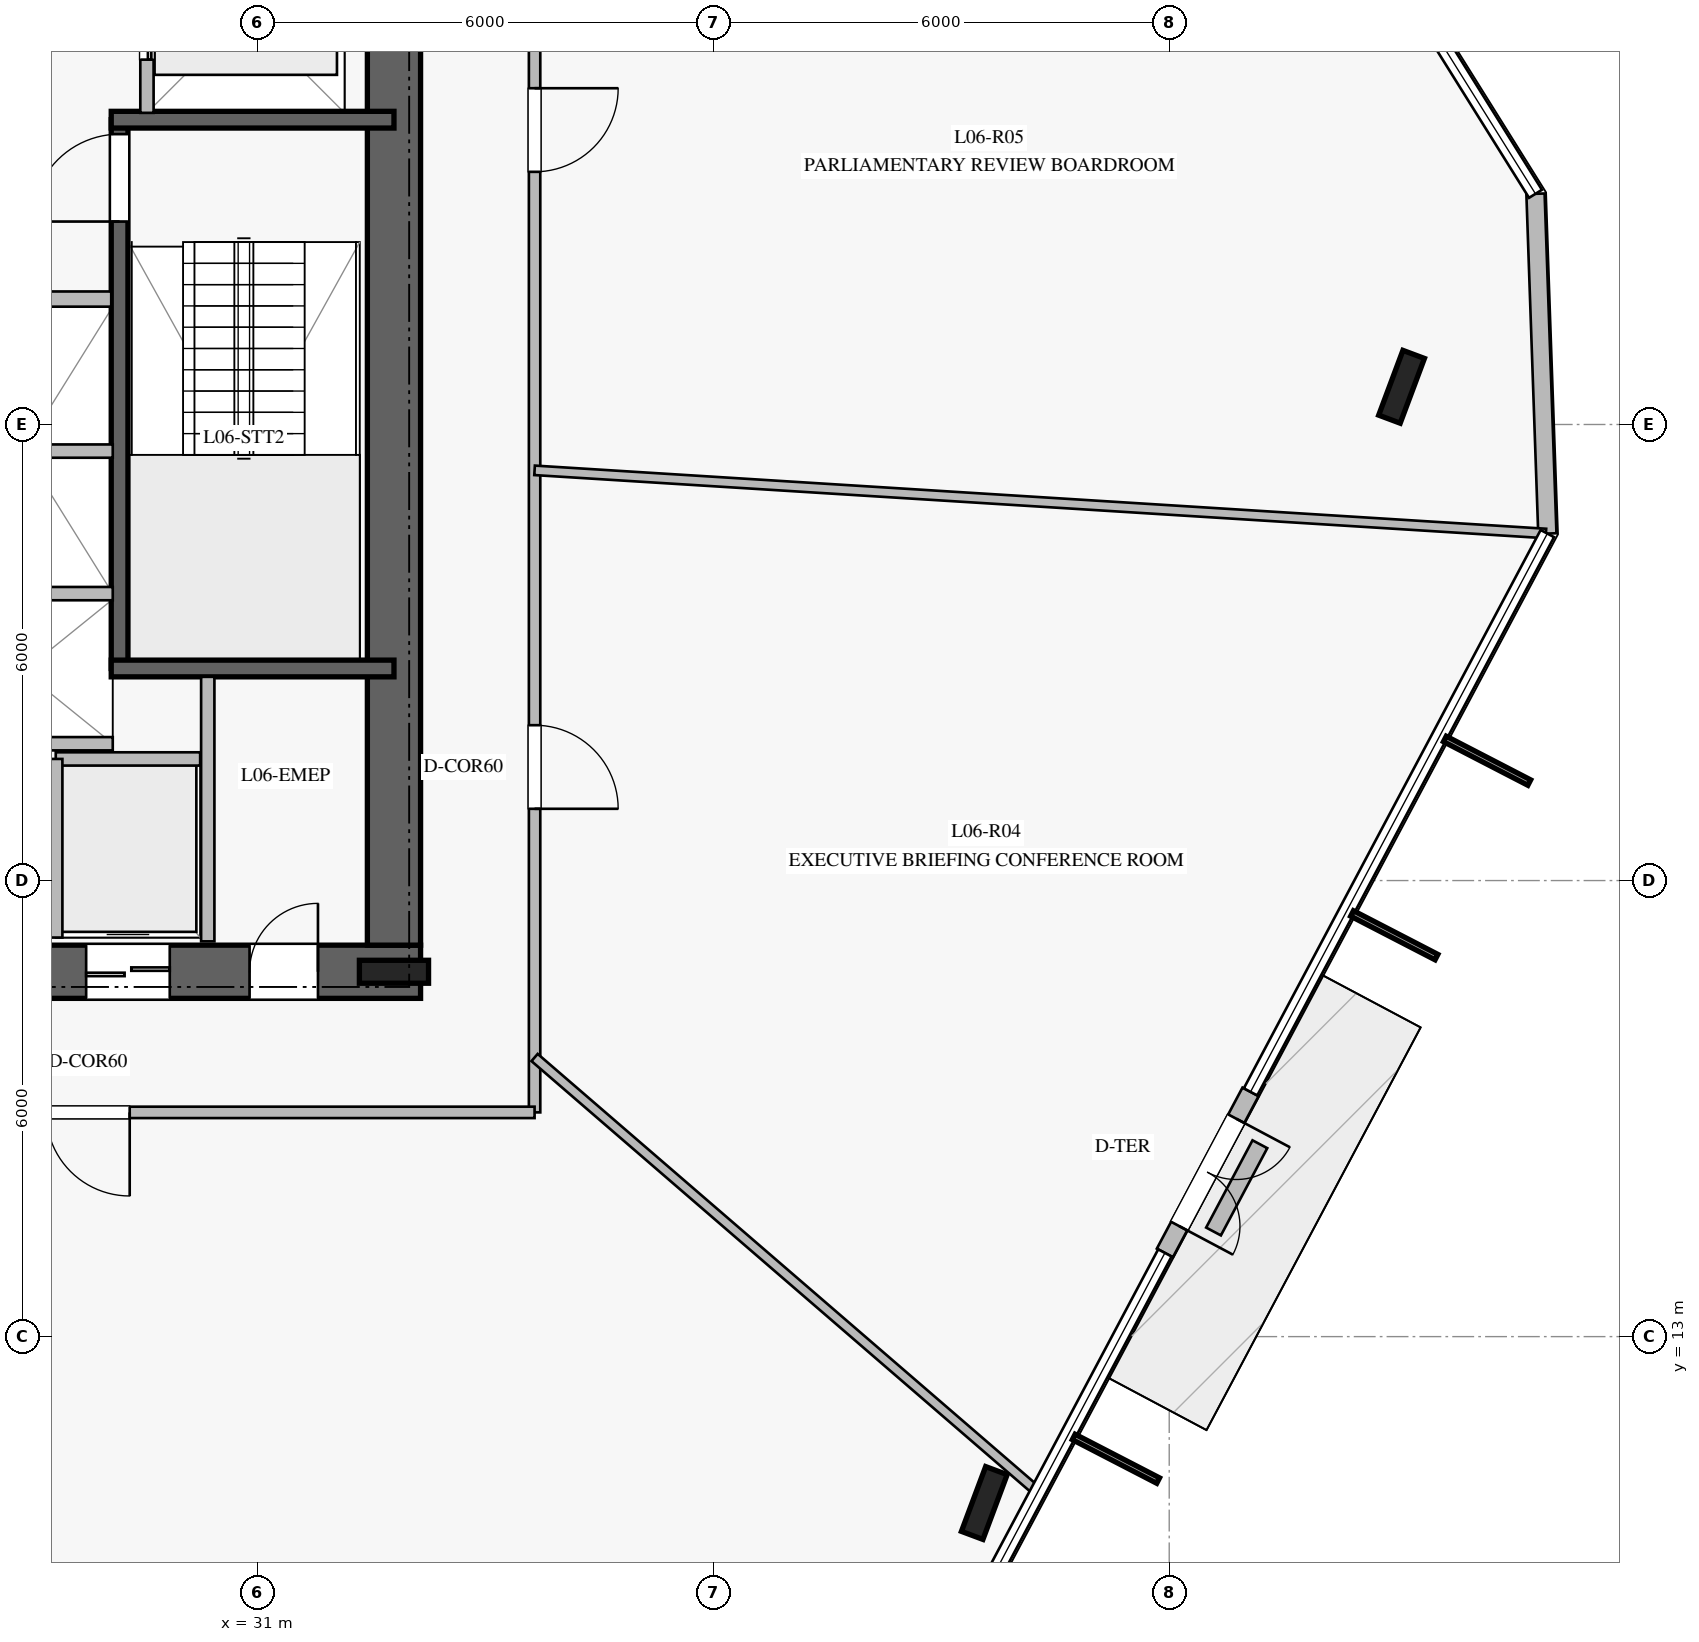
"""IFC4 building model, lengths in metres.
Left out: names, types, materials, properties, quantities, classifications, styles, units other than length and angle.
Written with IfcOpenShell. Run it as: python <this file> out.ifc"""

import sys

from ifc_helpers import new_model, si_unit, direction, frame, frame_2d, origin, origin_2d, place, context, subcontext, project, spatial, rectangle, i_section, extrude, element, fill, save


model = new_model("IFC4")
c1 = context("Model", 3, precision=1e-05, world=origin(), true_north=direction((0.0, 1.0)))
c2 = subcontext(c1, "Body", "Model", "MODEL_VIEW")
j1 = project(units=[si_unit("LENGTHUNIT", "METRE"), si_unit("PLANEANGLEUNIT", "RADIAN")], contexts=[c1])
p1 = place(None, origin())
s1 = spatial("IfcSite", under=j1, at=p1, CompositionType="ELEMENT")
p2 = place(p1, origin())
s2 = spatial("IfcBuilding", under=s1, at=p2, CompositionType="ELEMENT")
p3 = place(p2, frame((0.0, 0.0, 28.0)))
s3 = spatial("IfcBuildingStorey", under=s2, at=p3, CompositionType="ELEMENT", Elevation=28.0)
p4 = place(p3, frame((16.85, 17.8, 0.0), z_axis=(0.0, 0.0, 1.0), x_axis=(1.0, 0.0, 0.0)))
e1 = element("IfcWall", 1, at=p4, inside=s3, PredefinedType="SHEAR", context=c2, shape_type="SweptSolid", body=[
    extrude(rectangle(XDim=16.3, YDim=0.7, at=frame_2d((8.15, 0.0))), origin(), (0.0, 0.0, 1.0), 3.76),
])
p5 = place(p4, frame((5.1, 0.0, 0.0)))
e2 = element("IfcOpeningElement", 2, at=p5, cuts=e1, PredefinedType="OPENING", context=c2, shape_type="SweptSolid", body=[
    extrude(rectangle(XDim=1.2, YDim=2.25, at=frame_2d((0.6, 1.125))), frame((0.0, 0.36, 0.0), z_axis=(0.0, -1.0, 0.0), x_axis=(1.0, 0.0, 0.0)), (0.0, 0.0, 1.0), 0.72),
])
p6 = place(p4, frame((14.05, 0.0, 0.0)))
e3 = element("IfcOpeningElement", 3, at=p6, cuts=e1, PredefinedType="OPENING", context=c2, shape_type="SweptSolid", body=[
    extrude(rectangle(XDim=0.9, YDim=2.1, at=frame_2d((0.45, 1.05))), frame((0.0, 0.36, 0.0), z_axis=(0.0, -1.0, 0.0), x_axis=(1.0, 0.0, 0.0)), (0.0, 0.0, 1.0), 0.72),
])
p7 = place(p4, frame((7.95, 0.0, 0.0)))
e4 = element("IfcOpeningElement", 4, at=p7, cuts=e1, PredefinedType="OPENING", context=c2, shape_type="SweptSolid", body=[
    extrude(rectangle(XDim=1.1, YDim=2.2, at=frame_2d((0.55, 1.1))), frame((0.0, 0.36, 0.0), z_axis=(0.0, -1.0, 0.0), x_axis=(1.0, 0.0, 0.0)), (0.0, 0.0, 1.0), 0.72),
])
p8 = place(p4, frame((9.925, 0.0, 0.0)))
e5 = element("IfcOpeningElement", 5, at=p8, cuts=e1, PredefinedType="OPENING", context=c2, shape_type="SweptSolid", body=[
    extrude(rectangle(XDim=1.1, YDim=2.2, at=frame_2d((0.55, 1.1))), frame((0.0, 0.36, 0.0), z_axis=(0.0, -1.0, 0.0), x_axis=(1.0, 0.0, 0.0)), (0.0, 0.0, 1.0), 0.72),
])
p9 = place(p4, frame((11.9, 0.0, 0.0)))
e6 = element("IfcOpeningElement", 6, at=p9, cuts=e1, PredefinedType="OPENING", context=c2, shape_type="SweptSolid", body=[
    extrude(rectangle(XDim=1.1, YDim=2.2, at=frame_2d((0.55, 1.1))), frame((0.0, 0.36, 0.0), z_axis=(0.0, -1.0, 0.0), x_axis=(1.0, 0.0, 0.0)), (0.0, 0.0, 1.0), 0.72),
])
p10 = place(p3, frame((32.8, 18.15, 0.0), z_axis=(0.0, 0.0, 1.0), x_axis=(0.0, 1.0, 0.0)))
e7 = element("IfcWall", 7, at=p10, inside=s3, PredefinedType="SHEAR", context=c2, shape_type="SweptSolid", body=[
    extrude(rectangle(XDim=13.7, YDim=0.7, at=frame_2d((6.85, 0.0))), origin(), (0.0, 0.0, 1.0), 3.76),
])
p11 = place(p3, frame((32.8, 17.8, 0.0), z_axis=(0.0, 0.0, 1.0), x_axis=(1.0, 0.0, 0.0)))
e8 = element("IfcColumn", 8, at=p11, inside=s3, PredefinedType="COLUMN", context=c2, shape_type="SweptSolid", body=[
    extrude(i_section(OverallWidth=0.302, OverallDepth=0.91, WebThickness=0.021, FlangeThickness=0.04, at=origin_2d()), origin(), (0.0, 0.0, 1.0), 4.0),
])
p12 = place(p3, frame((29.19, 21.79, 0.0), z_axis=(0.0, 0.0, 1.0), x_axis=(0.0, 1.0, 0.0)))
e9 = element("IfcWall", 9, at=p12, inside=s3, PredefinedType="SOLIDWALL", context=c2, shape_type="SweptSolid", body=[
    extrude(rectangle(XDim=7.22, YDim=0.22, at=frame_2d((3.61, 0.0))), origin(), (0.0, 0.0, 1.0), 3.76),
])
p13 = place(p12, frame((5.88, 0.0, 0.0)))
e10 = element("IfcOpeningElement", 10, at=p13, cuts=e9, PredefinedType="OPENING", context=c2, shape_type="SweptSolid", body=[
    extrude(rectangle(XDim=1.15, YDim=2.2, at=frame_2d((0.575, 1.1))), frame((0.0, 0.12, 0.0), z_axis=(0.0, -1.0, 0.0), x_axis=(1.0, 0.0, 0.0)), (0.0, 0.0, 1.0), 0.24),
])
for number, where, z_axis, x_axis in (
    (11, (29.08, 21.79, 0.0), (0.0, 0.0, 1.0), (1.0, 0.0, 0.0)),
    (12, (29.08, 29.01, 0.0), (0.0, 0.0, 1.0), (1.0, 0.0, 0.0)),
):
    element("IfcWall", number, at=place(p3, frame(where, z_axis=z_axis, x_axis=x_axis)), inside=s3, PredefinedType="SOLIDWALL", context=c2, shape_type="SweptSolid", body=[
        extrude(rectangle(XDim=3.72, YDim=0.22, at=frame_2d((1.86, 0.0))), origin(), (0.0, 0.0, 1.0), 3.76),
    ])
for number, where, z_axis, x_axis in (
    (13, (40.567, 10.811, 0.0), (0.0, 0.0, 1.0), (0.35, 0.937, 0.0)),
    (14, (46.057, 25.496, 0.0), (0.0, 0.0, 1.0), (0.35, 0.937, 0.0)),
):
    element("IfcColumn", number, at=place(p3, frame(where, z_axis=z_axis, x_axis=x_axis)), inside=s3, PredefinedType="COLUMN", context=c2, shape_type="SweptSolid", body=[
        extrude(i_section(OverallWidth=0.302, OverallDepth=0.91, WebThickness=0.021, FlangeThickness=0.04, at=origin_2d()), origin(), (0.0, 0.0, 1.0), 4.0),
    ])
p14 = place(p3, frame((42.943, 14.101, 0.0), z_axis=(0.0, 0.0, 1.0), x_axis=(0.469574169619, 0.88289302819, 0.0)))
e15 = element("IfcWall", 15, at=p14, inside=s3, PredefinedType="STANDARD", context=c2, shape_type="SweptSolid", body=[
    extrude(rectangle(XDim=2.4, YDim=0.24, at=frame_2d((1.2, 0.0))), origin(), (0.0, 0.0, 1.0), 3.76),
])
p15 = place(p14, frame((0.4, 0.0, 0.0)))
e16 = element("IfcOpeningElement", 16, at=p15, cuts=e15, PredefinedType="OPENING", context=c2, shape_type="SweptSolid", body=[
    extrude(rectangle(XDim=1.6, YDim=2.25, at=frame_2d((0.8, 1.125))), frame((0.0, 0.13, 0.0), z_axis=(0.0, -1.0, 0.0), x_axis=(1.0, 0.0, 0.0)), (0.0, 0.0, 1.0), 0.26),
])
p16 = place(p3, frame((47.975, 23.565, 0.0), z_axis=(0.0, 0.0, 1.0), x_axis=(-0.034879631963, 0.999391520513, 0.0)))
e17 = element("IfcWall", 17, at=p16, inside=s3, PredefinedType="STANDARD", context=c2, shape_type="SweptSolid", body=[
    extrude(rectangle(XDim=4.473, YDim=0.24, at=frame_2d((2.236, 0.0))), origin(), (0.0, 0.0, 1.0), 3.76),
])
p17 = place(p3, frame((43.583, 14.383, 0.0), z_axis=(0.0, 0.0, 1.0), x_axis=(0.4693108362, 0.883033033938, 0.0)))
e18 = element("IfcWall", 18, at=p17, inside=s3, PredefinedType="USERDEFINED", context=c2, shape_type="SweptSolid", body=[
    extrude(rectangle(XDim=1.3, YDim=0.22, at=frame_2d((0.65, 0.0))), origin(), (0.0, 0.0, 1.0), 0.4),
])
p18 = place(p3, frame((25.7, 26.65, 0.0), z_axis=(0.0, 0.0, 1.0), x_axis=(1.0, 0.0, 0.0)))
e19 = element("IfcWall", 19, at=p18, inside=s3, PredefinedType="PARTITIONING", context=c2, shape_type="SweptSolid", body=[
    extrude(rectangle(XDim=3.38, YDim=0.2, at=frame_2d((1.69, 0.0))), origin(), (0.0, 0.0, 1.0), 3.76),
])
p19 = place(p3, frame((30.35, 18.2, 0.0), z_axis=(0.0, 0.0, 1.0), x_axis=(0.0, 1.0, 0.0)))
e20 = element("IfcWall", 20, at=p19, inside=s3, PredefinedType="PARTITIONING", context=c2, shape_type="SweptSolid", body=[
    extrude(rectangle(XDim=3.48, YDim=0.175, at=frame_2d((1.74, 0.0))), origin(), (0.0, 0.0, 1.0), 3.76),
])
p20 = place(p3, frame((28.35, 20.6, 0.0), z_axis=(0.0, 0.0, 1.0), x_axis=(1.0, 0.0, 0.0)))
e21 = element("IfcWall", 21, at=p20, inside=s3, PredefinedType="PARTITIONING", context=c2, shape_type="SweptSolid", body=[
    extrude(rectangle(XDim=1.9, YDim=0.175, at=frame_2d((0.95, 0.0))), origin(), (0.0, 0.0, 1.0), 3.76),
])
for number, where, z_axis, x_axis in (
    (22, (28.35, 18.25, 0.0), (0.0, 0.0, 1.0), (0.0, 1.0, 0.0)),
    (23, (26.75, 20.8, 0.0), (0.0, 0.0, 1.0), (1.0, 0.0, 0.0)),
    (24, (26.75, 22.775, 0.0), (0.0, 0.0, 1.0), (1.0, 0.0, 0.0)),
    (25, (26.75, 24.65, 0.0), (0.0, 0.0, 1.0), (1.0, 0.0, 0.0)),
):
    element("IfcWall", number, at=place(p3, frame(where, z_axis=z_axis, x_axis=x_axis)), inside=s3, PredefinedType="PARTITIONING", context=c2, shape_type="SweptSolid", body=[
        extrude(rectangle(XDim=2.35, YDim=0.175, at=frame_2d((1.175, 0.0))), origin(), (0.0, 0.0, 1.0), 3.76),
    ])
p21 = place(p3, frame((29.55, 29.1, 0.0), z_axis=(0.0, 0.0, 1.0), x_axis=(0.0, 1.0, 0.0)))
e26 = element("IfcWall", 26, at=p21, inside=s3, PredefinedType="PARTITIONING", context=c2, shape_type="SweptSolid", body=[
    extrude(rectangle(XDim=2.6, YDim=0.175, at=frame_2d((1.3, 0.0))), origin(), (0.0, 0.0, 1.0), 3.76),
])
p22 = place(p21, frame((0.7, 0.0, 0.0)))
e27 = element("IfcOpeningElement", 27, at=p22, cuts=e26, PredefinedType="OPENING", context=c2, shape_type="SweptSolid", body=[
    extrude(rectangle(XDim=1.2, YDim=2.2, at=frame_2d((0.6, 1.1))), frame((0.0, 0.098, 0.0), z_axis=(0.0, -1.0, 0.0), x_axis=(1.0, 0.0, 0.0)), (0.0, 0.0, 1.0), 0.195),
])
p23 = place(p3, frame((34.65, 34.05, 0.0), z_axis=(0.0, 0.0, 1.0), x_axis=(0.0, -1.0, 0.0)))
e28 = element("IfcWall", 28, at=p23, inside=s3, PredefinedType="PARTITIONING", context=c2, shape_type="SweptSolid", body=[
    extrude(rectangle(XDim=18.1, YDim=0.15, at=frame_2d((9.05, 0.0))), origin(), (0.0, 0.0, 1.0), 3.21),
])
p24 = place(p23, frame((13.006, 0.0, 0.0)))
e29 = element("IfcOpeningElement", 29, at=p24, cuts=e28, PredefinedType="OPENING", context=c2, shape_type="SweptSolid", body=[
    extrude(rectangle(XDim=1.1, YDim=2.2, at=frame_2d((0.55, 1.1))), frame((0.0, 0.085, 0.0), z_axis=(0.0, -1.0, 0.0), x_axis=(1.0, 0.0, 0.0)), (0.0, 0.0, 1.0), 0.17),
])
p25 = place(p23, frame((4.626, 0.0, 0.0)))
e30 = element("IfcOpeningElement", 30, at=p25, cuts=e28, PredefinedType="OPENING", context=c2, shape_type="SweptSolid", body=[
    extrude(rectangle(XDim=1.1, YDim=2.2, at=frame_2d((0.55, 1.1))), frame((0.0, 0.085, 0.0), z_axis=(0.0, -1.0, 0.0), x_axis=(1.0, 0.0, 0.0)), (0.0, 0.0, 1.0), 0.17),
])
p26 = place(p3, frame((34.65, 15.95, 0.0), z_axis=(0.0, 0.0, 1.0), x_axis=(-1.0, 0.0, 0.0)))
e31 = element("IfcWall", 31, at=p26, inside=s3, PredefinedType="PARTITIONING", context=c2, shape_type="SweptSolid", body=[
    extrude(rectangle(XDim=19.3, YDim=0.15, at=frame_2d((9.65, 0.0))), origin(), (0.0, 0.0, 1.0), 3.21),
])
p27 = place(p26, frame((14.523, 0.0, 0.0)))
e32 = element("IfcOpeningElement", 32, at=p27, cuts=e31, PredefinedType="OPENING", context=c2, shape_type="SweptSolid", body=[
    extrude(rectangle(XDim=1.1, YDim=2.2, at=frame_2d((0.55, 1.1))), frame((0.0, 0.085, 0.0), z_axis=(0.0, -1.0, 0.0), x_axis=(1.0, 0.0, 0.0)), (0.0, 0.0, 1.0), 0.17),
])
p28 = place(p26, frame((5.327, 0.0, 0.0)))
e33 = element("IfcOpeningElement", 33, at=p28, cuts=e31, PredefinedType="OPENING", context=c2, shape_type="SweptSolid", body=[
    extrude(rectangle(XDim=1.1, YDim=2.2, at=frame_2d((0.55, 1.1))), frame((0.0, 0.085, 0.0), z_axis=(0.0, -1.0, 0.0), x_axis=(1.0, 0.0, 0.0)), (0.0, 0.0, 1.0), 0.17),
])
p29 = place(p3, frame((34.65, 16.672, 0.0), z_axis=(0.0, 0.0, 1.0), x_axis=(0.757044964205, -0.65336277991, 0.0)))
e34 = element("IfcWall", 34, at=p29, inside=s3, PredefinedType="PARTITIONING", context=c2, shape_type="SweptSolid", body=[
    extrude(rectangle(XDim=8.729, YDim=0.125, at=frame_2d((4.364, 0.0))), origin(), (0.0, 0.0, 1.0), 3.06),
])
p30 = place(p3, frame((34.65, 24.397, 0.0), z_axis=(0.0, 0.0, 1.0), x_axis=(0.998055285193, -0.062334963686, 0.0)))
e35 = element("IfcWall", 35, at=p30, inside=s3, PredefinedType="PARTITIONING", context=c2, shape_type="SweptSolid", body=[
    extrude(rectangle(XDim=13.332, YDim=0.125, at=frame_2d((6.666, 0.0))), origin(), (0.0, 0.0, 1.0), 3.06),
])
p31 = place(p15, frame((1.6, 0.0, 0.0), z_axis=(0.0, 0.0, 1.0), x_axis=(-1.0, 0.0, 0.0)))
e36 = element("IfcDoor", 36, at=p31, inside=s3, OperationType="DOUBLE_DOOR_SINGLE_SWING", PredefinedType="DOOR", context=c2, shape_type="SweptSolid", body=[
    extrude(rectangle(XDim=1.6, YDim=2.25, at=frame_2d((0.8, 1.125))), frame((0.0, 0.025, 0.0), z_axis=(0.0, -1.0, 0.0), x_axis=(1.0, 0.0, 0.0)), (0.0, 0.0, 1.0), 0.05),
])
fill(e16, e36)
p32 = place(p13, origin())
e37 = element("IfcDoor", 37, at=p32, inside=s3, OperationType="SINGLE_SWING_LEFT", PredefinedType="DOOR", context=c2, shape_type="SweptSolid", body=[
    extrude(rectangle(XDim=1.15, YDim=2.2, at=frame_2d((0.575, 1.1))), frame((0.0, 0.025, 0.0), z_axis=(0.0, -1.0, 0.0), x_axis=(1.0, 0.0, 0.0)), (0.0, 0.0, 1.0), 0.05),
])
fill(e10, e37)
p33 = place(p6, origin())
e38 = element("IfcDoor", 38, at=p33, inside=s3, OperationType="SINGLE_SWING_RIGHT", PredefinedType="DOOR", context=c2, shape_type="SweptSolid", body=[
    extrude(rectangle(XDim=0.9, YDim=2.1, at=frame_2d((0.45, 1.05))), frame((0.0, 0.025, 0.0), z_axis=(0.0, -1.0, 0.0), x_axis=(1.0, 0.0, 0.0)), (0.0, 0.0, 1.0), 0.05),
])
fill(e3, e38)
p34 = place(p9, origin())
e39 = element("IfcDoor", 39, at=p34, inside=s3, OperationType="DOUBLE_DOOR_SLIDING", PredefinedType="DOOR", context=c2, shape_type="SweptSolid", body=[
    extrude(rectangle(XDim=1.1, YDim=2.2, at=frame_2d((0.55, 1.1))), frame((0.0, 0.025, 0.0), z_axis=(0.0, -1.0, 0.0), x_axis=(1.0, 0.0, 0.0)), (0.0, 0.0, 1.0), 0.05),
])
fill(e6, e39)
p35 = place(p22, origin())
e40 = element("IfcDoor", 40, at=p35, inside=s3, OperationType="DOUBLE_DOOR_SLIDING", PredefinedType="DOOR", context=c2, shape_type="SweptSolid", body=[
    extrude(rectangle(XDim=1.2, YDim=2.2, at=frame_2d((0.6, 1.1))), frame((0.0, 0.025, 0.0), z_axis=(0.0, -1.0, 0.0), x_axis=(1.0, 0.0, 0.0)), (0.0, 0.0, 1.0), 0.05),
])
fill(e27, e40)
p36 = place(p28, origin())
e41 = element("IfcDoor", 41, at=p36, inside=s3, OperationType="SINGLE_SWING_LEFT", PredefinedType="DOOR", context=c2, shape_type="SweptSolid", body=[
    extrude(rectangle(XDim=1.1, YDim=2.2, at=frame_2d((0.55, 1.1))), frame((0.0, 0.025, 0.0), z_axis=(0.0, -1.0, 0.0), x_axis=(1.0, 0.0, 0.0)), (0.0, 0.0, 1.0), 0.05),
])
fill(e33, e41)
p37 = place(p24, origin())
e42 = element("IfcDoor", 42, at=p37, inside=s3, OperationType="SINGLE_SWING_RIGHT", PredefinedType="DOOR", context=c2, shape_type="SweptSolid", body=[
    extrude(rectangle(XDim=1.1, YDim=2.2, at=frame_2d((0.55, 1.1))), frame((0.0, 0.025, 0.0), z_axis=(0.0, -1.0, 0.0), x_axis=(1.0, 0.0, 0.0)), (0.0, 0.0, 1.0), 0.05),
])
fill(e29, e42)
p38 = place(p25, origin())
e43 = element("IfcDoor", 43, at=p38, inside=s3, OperationType="SINGLE_SWING_LEFT", PredefinedType="DOOR", context=c2, shape_type="SweptSolid", body=[
    extrude(rectangle(XDim=1.1, YDim=2.2, at=frame_2d((0.55, 1.1))), frame((0.0, 0.025, 0.0), z_axis=(0.0, -1.0, 0.0), x_axis=(1.0, 0.0, 0.0)), (0.0, 0.0, 1.0), 0.05),
])
fill(e30, e43)
save(model, sys.argv[1])
